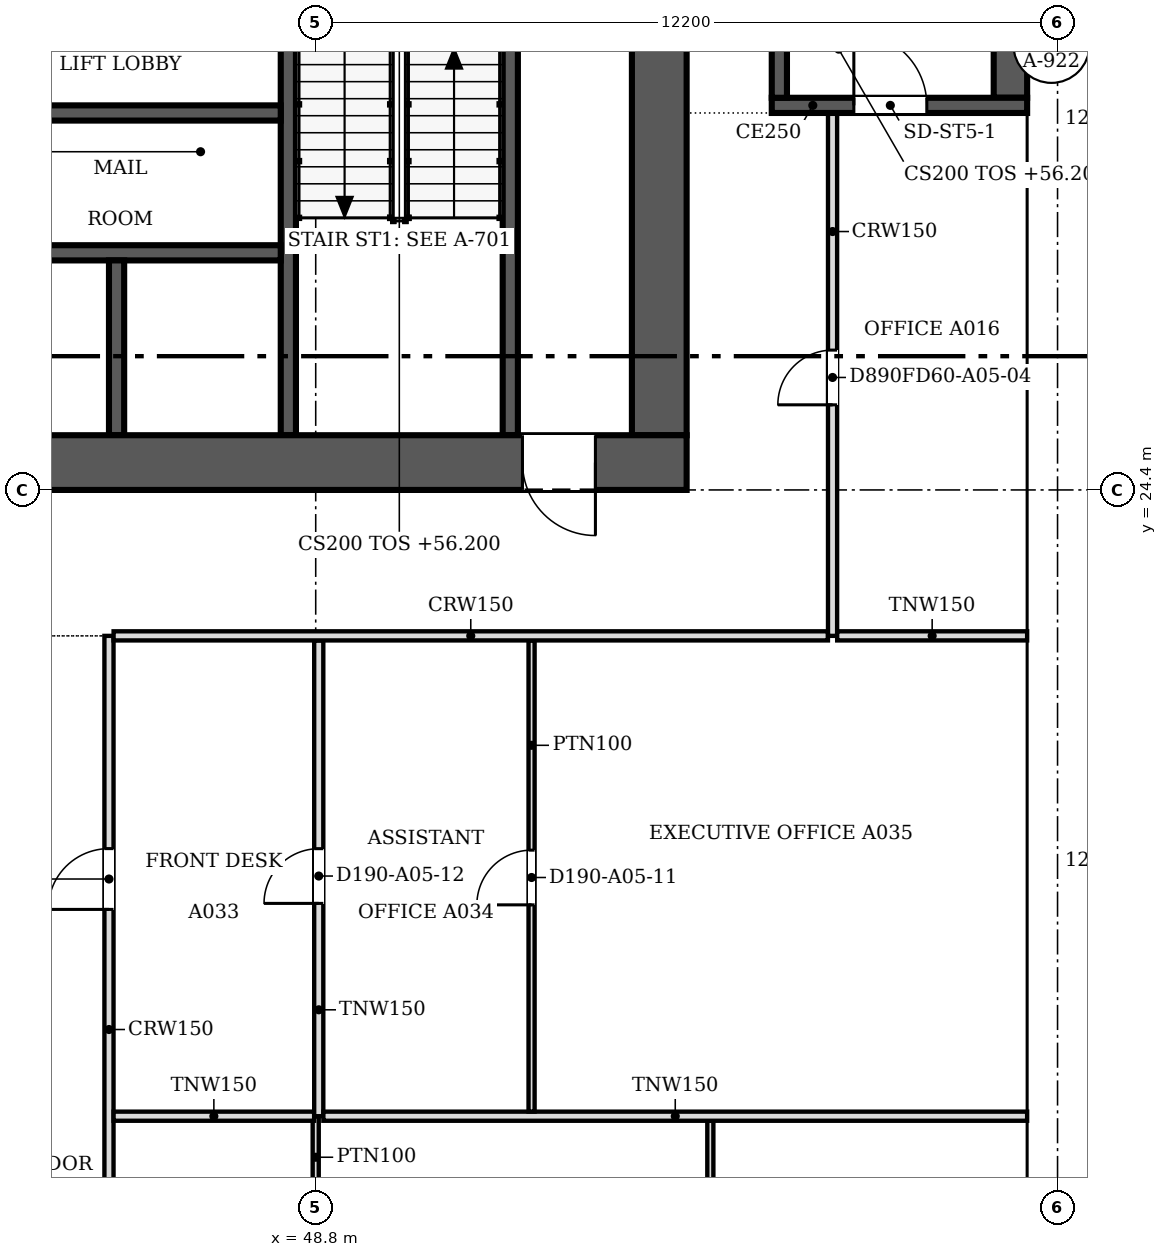
"""IFC4 building model, lengths in metres.
Left out: names, types, materials, properties, quantities, classifications, styles, units other than length and angle.
Written with IfcOpenShell. Run it as: python <this file> out.ifc"""

import sys

from ifc_helpers import new_model, si_unit, direction, frame, frame_2d, origin, place, context, subcontext, project, spatial, polyline, rectangle, outline, extrude, faceted_brep, source, transform, mapped, element, fill, save


model = new_model("IFC4")
c1 = context("Model", 3, precision=1e-05, world=origin(), true_north=direction((0.0, 1.0)))
c2 = subcontext(c1, "Body", "Model", "MODEL_VIEW")
j1 = project(units=[si_unit("LENGTHUNIT", "METRE"), si_unit("PLANEANGLEUNIT", "RADIAN")], contexts=[c1])
p1 = place(None, origin())
s1 = spatial("IfcSite", under=j1, at=p1, CompositionType="ELEMENT")
p2 = place(p1, origin())
s2 = spatial("IfcBuilding", under=s1, at=p2, CompositionType="ELEMENT")
p3 = place(p2, frame((0.0, 0.0, 56.2)))
s3 = spatial("IfcBuildingStorey", under=s2, at=p3, CompositionType="ELEMENT", Elevation=56.2)
m1 = source(origin(), c2, "Body", "SweptSolid", [
    extrude(outline(polyline([(3.05, 0.0), (6.1, 3.8), (3.05, 7.6), (0.0, 3.8), (3.05, 0.0)])), frame((0.0, 0.25, 0.0), z_axis=(0.0, -1.0, 0.0), x_axis=(1.0, 0.0, 0.0)), (0.0, 0.0, 1.0), 0.5),
])
p4 = place(p3, frame((60.75, 12.2, -3.8), z_axis=(0.0, 0.0, 1.0), x_axis=(0.0, 1.0, 0.0)))
e1 = element("IfcWall", 1, at=p4, inside=s3, PredefinedType="SOLIDWALL", context=c2, shape_type="MappedRepresentation", body=[
    mapped(m1, transform((0.0, 0.0, 0.0), scale=1.0)),
])
m2 = source(origin(), c2, "Body", "SweptSolid", [
    extrude(outline(polyline([(3.05, 0.399), (5.78, 3.8), (3.05, 7.201), (0.321, 3.8), (3.05, 0.399)])), frame((0.0, 0.26, 0.0), z_axis=(0.0, -1.0, 0.0), x_axis=(1.0, 0.0, 0.0)), (0.0, 0.0, 1.0), 0.52),
])
p5 = place(p4, origin())
e2 = element("IfcOpeningElement", 2, at=p5, cuts=e1, PredefinedType="OPENING", context=c2, shape_type="MappedRepresentation", body=[
    mapped(m2, transform((0.0, 0.0, 0.0), scale=1.0)),
])
m3 = source(origin(), c2, "Body", "Brep", [
    faceted_brep([(3.05, -0.25, 0.0), (6.1, -0.25, 3.8), (6.1, -0.25, 3.8), (3.05, -0.25, 7.6), (0.0, -0.25, 3.8), (0.0, 0.25, 3.8), (3.05, 0.25, 7.6), (6.1, 0.25, 3.8), (6.1, 0.25, 3.8), (3.05, 0.25, 0.0)], [[[0, 1, 2, 3, 4]], [[5, 6, 7, 8, 9]], [[9, 8, 1, 0]], [[7, 6, 3, 2]], [[6, 5, 4, 3]], [[5, 9, 0, 4]], [[1, 8, 7, 2]]]),
])
p6 = place(p3, frame((60.75, 18.3, -3.8), z_axis=(0.0, 0.0, 1.0), x_axis=(0.0, 1.0, 0.0)))
e3 = element("IfcWall", 3, at=p6, inside=s3, PredefinedType="SOLIDWALL", context=c2, shape_type="MappedRepresentation", body=[
    mapped(m3, transform((0.0, 0.0, 0.0), scale=1.0)),
])
p7 = place(p6, origin())
e4 = element("IfcOpeningElement", 4, at=p7, cuts=e3, PredefinedType="OPENING", context=c2, shape_type="MappedRepresentation", body=[
    mapped(m2, transform((0.0, 0.0, 0.0), scale=1.0)),
])
p8 = place(p3, frame((60.75, 24.4, -3.8), z_axis=(0.0, 0.0, 1.0), x_axis=(0.0, 1.0, 0.0)))
e5 = element("IfcWall", 5, at=p8, inside=s3, PredefinedType="SOLIDWALL", context=c2, shape_type="MappedRepresentation", body=[
    mapped(m1, transform((0.0, 0.0, 0.0), scale=1.0)),
])
p9 = place(p8, origin())
e6 = element("IfcOpeningElement", 6, at=p9, cuts=e5, PredefinedType="OPENING", context=c2, shape_type="MappedRepresentation", body=[
    mapped(m2, transform((0.0, 0.0, 0.0), scale=1.0)),
])
p10 = place(p3, frame((60.75, 30.5, -3.8), z_axis=(0.0, 0.0, 1.0), x_axis=(0.0, 1.0, 0.0)))
e7 = element("IfcWall", 7, at=p10, inside=s3, PredefinedType="SOLIDWALL", context=c2, shape_type="MappedRepresentation", body=[
    mapped(m1, transform((0.0, 0.0, 0.0), scale=1.0)),
])
p11 = place(p10, origin())
e8 = element("IfcOpeningElement", 8, at=p11, cuts=e7, PredefinedType="OPENING", context=c2, shape_type="MappedRepresentation", body=[
    mapped(m2, transform((0.0, 0.0, 0.0), scale=1.0)),
])
p12 = place(p2, frame((0.0, 0.0, 60.0)))
s4 = spatial("IfcBuildingStorey", under=s2, at=p12, CompositionType="ELEMENT", Elevation=60.0)
p13 = place(p12, frame((60.75, 9.15, -3.8), z_axis=(0.0, 0.0, 1.0), x_axis=(0.0, 1.0, 0.0)))
e9 = element("IfcWall", 9, at=p13, inside=s4, PredefinedType="SOLIDWALL", context=c2, shape_type="MappedRepresentation", body=[
    mapped(m1, transform((0.0, 0.0, 0.0), scale=1.0)),
])
p14 = place(p13, origin())
e10 = element("IfcOpeningElement", 10, at=p14, cuts=e9, PredefinedType="OPENING", context=c2, shape_type="MappedRepresentation", body=[
    mapped(m2, transform((0.0, 0.0, 0.0), scale=1.0)),
])
p15 = place(p12, frame((60.75, 15.25, -3.8), z_axis=(0.0, 0.0, 1.0), x_axis=(0.0, 1.0, 0.0)))
e11 = element("IfcWall", 11, at=p15, inside=s4, PredefinedType="SOLIDWALL", context=c2, shape_type="MappedRepresentation", body=[
    mapped(m1, transform((0.0, 0.0, 0.0), scale=1.0)),
])
p16 = place(p15, origin())
e12 = element("IfcOpeningElement", 12, at=p16, cuts=e11, PredefinedType="OPENING", context=c2, shape_type="MappedRepresentation", body=[
    mapped(m2, transform((0.0, 0.0, 0.0), scale=1.0)),
])
p17 = place(p12, frame((60.75, 21.35, -3.8), z_axis=(0.0, 0.0, 1.0), x_axis=(0.0, 1.0, 0.0)))
e13 = element("IfcWall", 13, at=p17, inside=s4, PredefinedType="SOLIDWALL", context=c2, shape_type="MappedRepresentation", body=[
    mapped(m3, transform((0.0, 0.0, 0.0), scale=1.0)),
])
p18 = place(p17, origin())
e14 = element("IfcOpeningElement", 14, at=p18, cuts=e13, PredefinedType="OPENING", context=c2, shape_type="MappedRepresentation", body=[
    mapped(m2, transform((0.0, 0.0, 0.0), scale=1.0)),
])
p19 = place(p12, frame((60.75, 27.45, -3.8), z_axis=(0.0, 0.0, 1.0), x_axis=(0.0, 1.0, 0.0)))
e15 = element("IfcWall", 15, at=p19, inside=s4, PredefinedType="SOLIDWALL", context=c2, shape_type="MappedRepresentation", body=[
    mapped(m1, transform((0.0, 0.0, 0.0), scale=1.0)),
])
p20 = place(p19, origin())
e16 = element("IfcOpeningElement", 16, at=p20, cuts=e15, PredefinedType="OPENING", context=c2, shape_type="MappedRepresentation", body=[
    mapped(m2, transform((0.0, 0.0, 0.0), scale=1.0)),
])
p21 = place(p3, frame((54.9, 24.85, 0.0), z_axis=(0.0, 0.0, 1.0), x_axis=(-1.0, 0.0, 0.0)))
e17 = element("IfcWall", 17, at=p21, inside=s3, PredefinedType="SHEAR", context=c2, shape_type="SweptSolid", body=[
    extrude(rectangle(XDim=24.4, YDim=0.9, at=frame_2d((12.2, 0.0))), origin(), (0.0, 0.0, 1.0), 3.8),
])
m4 = source(origin(), c2, "Body", "SweptSolid", [
    extrude(rectangle(XDim=1.2, YDim=2.1, at=frame_2d((0.6, 1.05))), frame((0.0, 0.46, 0.0), z_axis=(0.0, -1.0, 0.0), x_axis=(1.0, 0.0, 0.0)), (0.0, 0.0, 1.0), 0.92),
])
p22 = place(p21, frame((1.5, 0.0, 0.0)))
e18 = element("IfcOpeningElement", 18, at=p22, cuts=e17, PredefinedType="OPENING", context=c2, shape_type="MappedRepresentation", body=[
    mapped(m4, transform((0.0, 0.0, 0.0), scale=1.0)),
])
p23 = place(p3, frame((54.45, 47.9, 0.0), z_axis=(0.0, 0.0, 1.0), x_axis=(0.0, -1.0, 0.0)))
e19 = element("IfcWall", 19, at=p23, inside=s3, PredefinedType="SHEAR", context=c2, shape_type="SweptSolid", body=[
    extrude(rectangle(XDim=22.6, YDim=0.9, at=frame_2d((11.3, 0.0))), origin(), (0.0, 0.0, 1.0), 3.8),
])
p24 = place(p23, frame((4.6, 0.0, 0.0)))
e20 = element("IfcOpeningElement", 20, at=p24, cuts=e19, PredefinedType="OPENING", context=c2, shape_type="MappedRepresentation", body=[
    mapped(m4, transform((0.0, 0.0, 0.0), scale=1.0)),
])
p25 = place(p3, frame((48.35, 36.35, 0.0), z_axis=(0.0, 0.0, 1.0), x_axis=(0.0, -1.0, 0.0)))
e21 = element("IfcWall", 21, at=p25, inside=s3, PredefinedType="SOLIDWALL", context=c2, shape_type="SweptSolid", body=[
    extrude(rectangle(XDim=11.05, YDim=0.25, at=frame_2d((5.525, 0.0))), origin(), (0.0, 0.0, 1.0), 3.8),
])
m5 = source(origin(), c2, "Body", "SweptSolid", [
    extrude(rectangle(XDim=1.2, YDim=2.1, at=frame_2d((0.6, 1.05))), frame((0.0, 0.135, 0.0), z_axis=(0.0, -1.0, 0.0), x_axis=(1.0, 0.0, 0.0)), (0.0, 0.0, 1.0), 0.27),
])
p26 = place(p25, frame((3.225, 0.0, 0.0)))
e22 = element("IfcOpeningElement", 22, at=p26, cuts=e21, PredefinedType="OPENING", context=c2, shape_type="MappedRepresentation", body=[
    mapped(m5, transform((0.0, 0.0, 0.0), scale=1.0)),
])
p27 = place(p3, frame((42.95, 28.3, 0.0), z_axis=(0.0, 0.0, 1.0), x_axis=(1.0, 0.0, 0.0)))
e23 = element("IfcWall", 23, at=p27, inside=s3, PredefinedType="SOLIDWALL", context=c2, shape_type="SweptSolid", body=[
    extrude(rectangle(XDim=5.275, YDim=0.25, at=frame_2d((2.638, 0.0))), origin(), (0.0, 0.0, 1.0), 3.8),
])
p28 = place(p3, frame((52.0, 25.3, 0.0), z_axis=(0.0, 0.0, 1.0), x_axis=(0.0, 1.0, 0.0)))
e24 = element("IfcWall", 24, at=p28, inside=s3, PredefinedType="SOLIDWALL", context=c2, shape_type="SweptSolid", body=[
    extrude(rectangle(XDim=7.975, YDim=0.25, at=frame_2d((3.987, 0.0))), origin(), (0.0, 0.0, 1.0), 3.8),
])
p29 = place(p28, frame((6.625, 0.0, 0.0)))
e25 = element("IfcOpeningElement", 25, at=p29, cuts=e24, PredefinedType="OPENING", context=c2, shape_type="MappedRepresentation", body=[
    mapped(m5, transform((0.0, 0.0, 0.0), scale=1.0)),
])
p30 = place(p3, frame((42.95, 30.6, 0.0), z_axis=(0.0, 0.0, 1.0), x_axis=(1.0, 0.0, 0.0)))
e26 = element("IfcWall", 26, at=p30, inside=s3, PredefinedType="SOLIDWALL", context=c2, shape_type="SweptSolid", body=[
    extrude(rectangle(XDim=5.275, YDim=0.25, at=frame_2d((2.638, 0.0))), origin(), (0.0, 0.0, 1.0), 3.8),
])
p31 = place(p3, frame((45.525, 25.3, 0.0), z_axis=(0.0, 0.0, 1.0), x_axis=(0.0, 1.0, 0.0)))
e27 = element("IfcWall", 27, at=p31, inside=s3, PredefinedType="SOLIDWALL", context=c2, shape_type="SweptSolid", body=[
    extrude(rectangle(XDim=2.875, YDim=0.25, at=frame_2d((1.438, 0.0))), origin(), (0.0, 0.0, 1.0), 3.8),
])
p32 = place(p3, frame((60.5, 30.725, 0.0), z_axis=(0.0, 0.0, 1.0), x_axis=(-1.0, 0.0, 0.0)))
e28 = element("IfcWall", 28, at=p32, inside=s3, PredefinedType="SOLIDWALL", context=c2, shape_type="SweptSolid", body=[
    extrude(rectangle(XDim=4.2, YDim=0.25, at=frame_2d((2.1, 0.0))), origin(), (0.0, 0.0, 1.0), 3.8),
])
p33 = place(p32, frame((1.65, 0.0, 0.0)))
e29 = element("IfcOpeningElement", 29, at=p33, cuts=e28, PredefinedType="OPENING", context=c2, shape_type="MappedRepresentation", body=[
    mapped(m5, transform((0.0, 0.0, 0.0), scale=1.0)),
])
p34 = place(p3, frame((56.425, 30.85, 0.0), z_axis=(0.0, 0.0, 1.0), x_axis=(0.0, 1.0, 0.0)))
e30 = element("IfcWall", 30, at=p34, inside=s3, PredefinedType="SOLIDWALL", context=c2, shape_type="SweptSolid", body=[
    extrude(rectangle(XDim=8.0, YDim=0.25, at=frame_2d((4.0, 0.0))), origin(), (0.0, 0.0, 1.0), 3.8),
])
p35 = place(p3, frame((60.225, 38.85, 0.0), z_axis=(0.0, 0.0, 1.0), x_axis=(0.0, -1.0, 0.0)))
e31 = element("IfcWall", 31, at=p35, inside=s3, PredefinedType="SOLIDWALL", context=c2, shape_type="SweptSolid", body=[
    extrude(rectangle(XDim=8.0, YDim=0.55, at=frame_2d((4.0, 0.0))), origin(), (0.0, 0.0, 1.0), 3.8),
])
p36 = place(p3, frame((45.4, 22.0, 0.0), z_axis=(0.0, 0.0, 1.0), x_axis=(0.0, -1.0, 0.0)))
e32 = element("IfcWall", 32, at=p36, inside=s3, PredefinedType="PARTITIONING", context=c2, shape_type="SweptSolid", body=[
    extrude(rectangle(XDim=17.8, YDim=0.15, at=frame_2d((8.9, 0.0))), origin(), (0.0, 0.0, 1.0), 3.067),
])
m6 = source(origin(), c2, "Body", "SweptSolid", [
    extrude(rectangle(XDim=1.0, YDim=2.1, at=frame_2d((0.5, 1.05))), frame((0.0, 0.085, 0.0), z_axis=(0.0, -1.0, 0.0), x_axis=(1.0, 0.0, 0.0)), (0.0, 0.0, 1.0), 0.17),
])
p37 = place(p36, frame((3.499, 0.0, 0.0)))
e33 = element("IfcOpeningElement", 33, at=p37, cuts=e32, PredefinedType="OPENING", context=c2, shape_type="MappedRepresentation", body=[
    mapped(m6, transform((0.0, 0.0, 0.0), scale=1.0)),
])
m7 = source(origin(), c2, "Body", "SweptSolid", [
    extrude(rectangle(XDim=0.9, YDim=2.1, at=frame_2d((0.45, 1.05))), frame((0.0, 0.085, 0.0), z_axis=(0.0, -1.0, 0.0), x_axis=(1.0, 0.0, 0.0)), (0.0, 0.0, 1.0), 0.17),
])
p38 = place(p36, frame((12.4, 0.0, 0.0)))
e34 = element("IfcOpeningElement", 34, at=p38, cuts=e32, PredefinedType="OPENING", context=c2, shape_type="MappedRepresentation", body=[
    mapped(m7, transform((0.0, 0.0, 0.0), scale=1.0)),
])
p39 = place(p3, frame((55.29, 14.024, 0.0), z_axis=(0.0, 0.0, 1.0), x_axis=(0.0, -1.0, 0.0)))
e35 = element("IfcWall", 35, at=p39, inside=s3, PredefinedType="PARTITIONING", context=c2, shape_type="SweptSolid", body=[
    extrude(rectangle(XDim=5.924, YDim=0.1, at=frame_2d((2.962, 0.0))), origin(), (0.0, 0.0, 1.0), 3.067),
])
m8 = source(origin(), c2, "Body", "SweptSolid", [
    extrude(rectangle(XDim=0.9, YDim=2.1, at=frame_2d((0.45, 1.05))), frame((0.0, 0.06, 0.0), z_axis=(0.0, -1.0, 0.0), x_axis=(1.0, 0.0, 0.0)), (0.0, 0.0, 1.0), 0.12),
])
p40 = place(p39, frame((2.524, 0.0, 0.0)))
e36 = element("IfcOpeningElement", 36, at=p40, cuts=e35, PredefinedType="OPENING", context=c2, shape_type="MappedRepresentation", body=[
    mapped(m8, transform((0.0, 0.0, 0.0), scale=1.0)),
])
p41 = place(p3, frame((48.8, 12.75, 0.0), z_axis=(0.0, 0.0, 1.0), x_axis=(0.0, 1.0, 0.0)))
e37 = element("IfcWall", 37, at=p41, inside=s3, PredefinedType="PARTITIONING", context=c2, shape_type="SweptSolid", body=[
    extrude(rectangle(XDim=1.35, YDim=0.1, at=frame_2d((0.675, 0.0))), origin(), (0.0, 0.0, 1.0), 3.067),
])
p42 = place(p3, frame((45.476, 14.1, 0.0), z_axis=(0.0, 0.0, 1.0), x_axis=(1.0, 0.0, 0.0)))
e38 = element("IfcWall", 38, at=p42, inside=s3, PredefinedType="PARTITIONING", context=c2, shape_type="SweptSolid", body=[
    extrude(rectangle(XDim=3.298, YDim=0.15, at=frame_2d((1.649, 0.0))), origin(), (0.0, 0.0, 1.0), 3.067),
])
p43 = place(p3, frame((48.85, 21.924, 0.0), z_axis=(0.0, 0.0, 1.0), x_axis=(0.0, -1.0, 0.0)))
e39 = element("IfcWall", 39, at=p43, inside=s3, PredefinedType="PARTITIONING", context=c2, shape_type="SweptSolid", body=[
    extrude(rectangle(XDim=7.824, YDim=0.15, at=frame_2d((3.912, 0.0))), origin(), (0.0, 0.0, 1.0), 3.067),
])
p44 = place(p43, frame((3.424, 0.0, 0.0)))
e40 = element("IfcOpeningElement", 40, at=p44, cuts=e39, PredefinedType="OPENING", context=c2, shape_type="MappedRepresentation", body=[
    mapped(m7, transform((0.0, 0.0, 0.0), scale=1.0)),
])
p45 = place(p3, frame((48.926, 14.1, 0.0), z_axis=(0.0, 0.0, 1.0), x_axis=(1.0, 0.0, 0.0)))
e41 = element("IfcWall", 41, at=p45, inside=s3, PredefinedType="PARTITIONING", context=c2, shape_type="SweptSolid", body=[
    extrude(rectangle(XDim=11.574, YDim=0.15, at=frame_2d((5.787, 0.0))), origin(), (0.0, 0.0, 1.0), 3.067),
])
p46 = place(p3, frame((52.35, 21.924, 0.0), z_axis=(0.0, 0.0, 1.0), x_axis=(0.0, -1.0, 0.0)))
e42 = element("IfcWall", 42, at=p46, inside=s3, PredefinedType="PARTITIONING", context=c2, shape_type="SweptSolid", body=[
    extrude(rectangle(XDim=7.748, YDim=0.1, at=frame_2d((3.874, 0.0))), origin(), (0.0, 0.0, 1.0), 3.067),
])
p47 = place(p46, frame((3.448, 0.0, 0.0)))
e43 = element("IfcOpeningElement", 43, at=p47, cuts=e42, PredefinedType="OPENING", context=c2, shape_type="MappedRepresentation", body=[
    mapped(m8, transform((0.0, 0.0, 0.0), scale=1.0)),
])
p48 = place(p3, frame((45.476, 22.0, 0.0), z_axis=(0.0, 0.0, 1.0), x_axis=(1.0, 0.0, 0.0)))
e44 = element("IfcWall", 44, at=p48, inside=s3, PredefinedType="PARTITIONING", context=c2, shape_type="SweptSolid", body=[
    extrude(rectangle(XDim=11.748, YDim=0.15, at=frame_2d((5.874, 0.0))), origin(), (0.0, 0.0, 1.0), 3.067),
])
p49 = place(p3, frame((57.3, 30.6, 0.0), z_axis=(0.0, 0.0, 1.0), x_axis=(0.0, -1.0, 0.0)))
e45 = element("IfcWall", 45, at=p49, inside=s3, PredefinedType="PARTITIONING", context=c2, shape_type="SweptSolid", body=[
    extrude(rectangle(XDim=8.6, YDim=0.15, at=frame_2d((4.3, 0.0))), origin(), (0.0, 0.0, 1.0), 3.067),
])
p50 = place(p49, frame((3.9, 0.0, 0.0)))
e46 = element("IfcOpeningElement", 46, at=p50, cuts=e45, PredefinedType="OPENING", context=c2, shape_type="MappedRepresentation", body=[
    mapped(m7, transform((0.0, 0.0, 0.0), scale=1.0)),
])
p51 = place(p3, frame((57.376, 22.0, 0.0), z_axis=(0.0, 0.0, 1.0), x_axis=(1.0, 0.0, 0.0)))
e47 = element("IfcWall", 47, at=p51, inside=s3, PredefinedType="PARTITIONING", context=c2, shape_type="SweptSolid", body=[
    extrude(rectangle(XDim=3.124, YDim=0.15, at=frame_2d((1.562, 0.0))), origin(), (0.0, 0.0, 1.0), 3.067),
])
m9 = source(origin(), c2, "Body", "SweptSolid", [
    extrude(rectangle(XDim=1.2, YDim=2.1, at=frame_2d((0.6, 1.05))), frame((0.0, 0.025, 0.0), z_axis=(0.0, -1.0, 0.0), x_axis=(1.0, 0.0, 0.0)), (0.0, 0.0, 1.0), 0.05),
])
p52 = place(p22, origin())
e48 = element("IfcDoor", 48, at=p52, inside=s3, OperationType="SINGLE_SWING_LEFT", PredefinedType="DOOR", context=c2, shape_type="MappedRepresentation", body=[
    mapped(m9, transform((0.0, 0.0, 0.0), scale=1.0)),
])
fill(e18, e48)
p53 = place(p33, origin())
e49 = element("IfcDoor", 49, at=p53, inside=s3, OperationType="SINGLE_SWING_RIGHT", PredefinedType="DOOR", context=c2, shape_type="MappedRepresentation", body=[
    mapped(m9, transform((0.0, 0.0, 0.0), scale=1.0)),
])
fill(e29, e49)
m10 = source(origin(), c2, "Body", "SweptSolid", [
    extrude(rectangle(XDim=0.9, YDim=2.1, at=frame_2d((0.45, 1.05))), frame((0.0, 0.025, 0.0), z_axis=(0.0, -1.0, 0.0), x_axis=(1.0, 0.0, 0.0)), (0.0, 0.0, 1.0), 0.05),
])
p54 = place(p47, origin())
e50 = element("IfcDoor", 50, at=p54, inside=s3, OperationType="SINGLE_SWING_RIGHT", PredefinedType="DOOR", context=c2, shape_type="MappedRepresentation", body=[
    mapped(m10, transform((0.0, 0.0, 0.0), scale=1.0)),
])
fill(e43, e50)
p55 = place(p44, origin())
e51 = element("IfcDoor", 51, at=p55, inside=s3, OperationType="SINGLE_SWING_RIGHT", PredefinedType="DOOR", context=c2, shape_type="MappedRepresentation", body=[
    mapped(m10, transform((0.0, 0.0, 0.0), scale=1.0)),
])
fill(e40, e51)
m11 = source(origin(), c2, "Body", "SweptSolid", [
    extrude(rectangle(XDim=1.0, YDim=2.1, at=frame_2d((0.5, 1.05))), frame((0.0, 0.025, 0.0), z_axis=(0.0, -1.0, 0.0), x_axis=(1.0, 0.0, 0.0)), (0.0, 0.0, 1.0), 0.05),
])
p56 = place(p37, origin())
e52 = element("IfcDoor", 52, at=p56, inside=s3, OperationType="SINGLE_SWING_RIGHT", PredefinedType="DOOR", context=c2, shape_type="MappedRepresentation", body=[
    mapped(m11, transform((0.0, 0.0, 0.0), scale=1.0)),
])
fill(e33, e52)
p57 = place(p50, origin())
e53 = element("IfcDoor", 53, at=p57, inside=s3, OperationType="SINGLE_SWING_RIGHT", PredefinedType="DOOR", context=c2, shape_type="MappedRepresentation", body=[
    mapped(m10, transform((0.0, 0.0, 0.0), scale=1.0)),
])
fill(e46, e53)
save(model, sys.argv[1])
